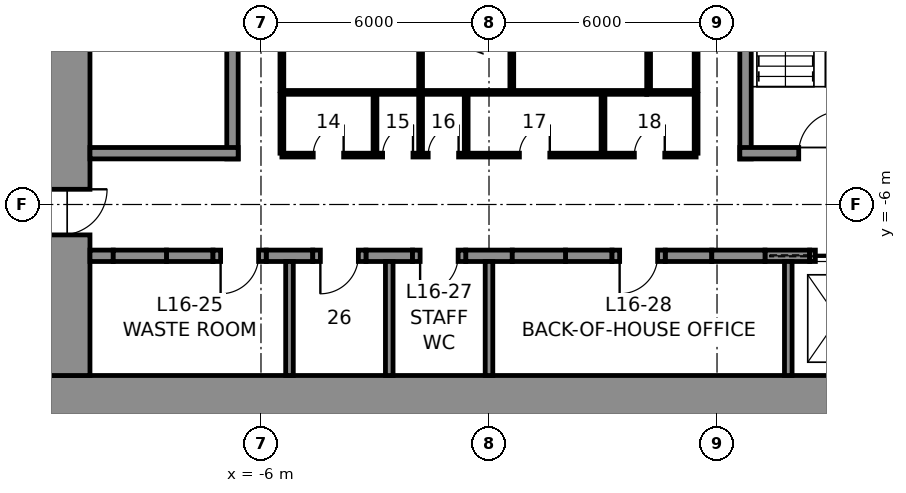
"""IFC4 building model, lengths in metres.
Left out: names, types, materials, properties, quantities, classifications, styles, units other than length and angle.
Written with IfcOpenShell. Run it as: python <this file> out.ifc"""

import sys

from ifc_helpers import new_model, si_unit, direction, frame, frame_2d, origin, place, context, subcontext, project, spatial, rectangle, extrude, element, fill, save


model = new_model("IFC4")
c1 = context("Model", 3, precision=1e-05, world=origin(), true_north=direction((0.0, 1.0)))
c2 = subcontext(c1, "Body", "Model", "MODEL_VIEW")
j1 = project(units=[si_unit("LENGTHUNIT", "METRE"), si_unit("PLANEANGLEUNIT", "RADIAN")], contexts=[c1])
p1 = place(None, origin())
s1 = spatial("IfcSite", under=j1, at=p1, CompositionType="ELEMENT")
p2 = place(p1, origin())
s2 = spatial("IfcBuilding", under=s1, at=p2, CompositionType="ELEMENT")
p3 = place(p2, frame((0.0, 0.0, 86.0)))
s3 = spatial("IfcBuildingStorey", under=s2, at=p3, CompositionType="ELEMENT", Elevation=86.0)
p4 = place(p3, frame((12.0, -11.25, 0.0), z_axis=(0.0, 0.0, 1.0), x_axis=(-1.0, 0.0, 0.0)))
e1 = element("IfcWall", 1, at=p4, inside=s3, PredefinedType="SHEAR", context=c2, shape_type="SweptSolid", body=[
    extrude(rectangle(XDim=24.0, YDim=1.5, at=frame_2d((12.0, 0.0))), origin(), (0.0, 0.0, 1.0), 4.6),
])
p5 = place(p3, frame((-11.25, -10.5, 0.0), z_axis=(0.0, 0.0, 1.0), x_axis=(0.0, 1.0, 0.0)))
e2 = element("IfcWall", 2, at=p5, inside=s3, PredefinedType="SHEAR", context=c2, shape_type="SweptSolid", body=[
    extrude(rectangle(XDim=21.0, YDim=1.5, at=frame_2d((10.5, 0.0))), origin(), (0.0, 0.0, 1.0), 4.6),
])
p6 = place(p5, frame((16.1, 0.0, 0.0)))
e3 = element("IfcOpeningElement", 3, at=p6, cuts=e2, PredefinedType="OPENING", context=c2, shape_type="SweptSolid", body=[
    extrude(rectangle(XDim=1.2, YDim=2.3, at=frame_2d((0.6, 1.15))), frame((0.0, 0.76, 0.0), z_axis=(0.0, -1.0, 0.0), x_axis=(1.0, 0.0, 0.0)), (0.0, 0.0, 1.0), 1.52),
])
p7 = place(p5, frame((3.7, 0.0, 0.0)))
e4 = element("IfcOpeningElement", 4, at=p7, cuts=e2, PredefinedType="OPENING", context=c2, shape_type="SweptSolid", body=[
    extrude(rectangle(XDim=1.2, YDim=2.3, at=frame_2d((0.6, 1.15))), frame((0.0, 0.76, 0.0), z_axis=(0.0, -1.0, 0.0), x_axis=(1.0, 0.0, 0.0)), (0.0, 0.0, 1.0), 1.52),
])
p8 = place(p3, frame((-10.5, -7.35, 0.0), z_axis=(0.0, 0.0, 1.0), x_axis=(1.0, 0.0, 0.0)))
e5 = element("IfcWall", 5, at=p8, inside=s3, PredefinedType="SHEAR", context=c2, shape_type="SweptSolid", body=[
    extrude(rectangle(XDim=0.613, YDim=0.3, at=frame_2d((0.306, 0.0))), origin(), (0.0, 0.0, 1.0), 4.6),
])
for number, where, z_axis, x_axis in (
    (6, (-8.488, -7.35, 0.0), (0.0, 0.0, 1.0), (1.0, 0.0, 0.0)),
    (7, (-5.863, -7.35, 0.0), (0.0, 0.0, 1.0), (1.0, 0.0, 0.0)),
    (8, (-3.238, -7.35, 0.0), (0.0, 0.0, 1.0), (1.0, 0.0, 0.0)),
    (9, (-0.613, -7.35, 0.0), (0.0, 0.0, 1.0), (1.0, 0.0, 0.0)),
    (10, (2.012, -7.35, 0.0), (0.0, 0.0, 1.0), (1.0, 0.0, 0.0)),
    (11, (4.637, -7.35, 0.0), (0.0, 0.0, 1.0), (1.0, 0.0, 0.0)),
):
    element("IfcWall", number, at=place(p3, frame(where, z_axis=z_axis, x_axis=x_axis)), inside=s3, PredefinedType="SHEAR", context=c2, shape_type="SweptSolid", body=[
        extrude(rectangle(XDim=1.225, YDim=0.3, at=frame_2d((0.613, 0.0))), origin(), (0.0, 0.0, 1.0), 4.6),
    ])
p9 = place(p3, frame((7.262, -7.35, 0.0), z_axis=(0.0, 0.0, 1.0), x_axis=(1.0, 0.0, 0.0)))
e12 = element("IfcWall", 12, at=p9, inside=s3, PredefinedType="SHEAR", context=c2, shape_type="SweptSolid", body=[
    extrude(rectangle(XDim=1.175, YDim=0.3, at=frame_2d((0.587, 0.0))), origin(), (0.0, 0.0, 1.0), 4.6),
])
p10 = place(p3, frame((-9.887, -7.35, 0.0), z_axis=(0.0, 0.0, 1.0), x_axis=(1.0, 0.0, 0.0)))
e13 = element("IfcWall", 13, at=p10, inside=s3, PredefinedType="PARTITIONING", context=c2, shape_type="SweptSolid", body=[
    extrude(rectangle(XDim=1.4, YDim=0.3, at=frame_2d((0.7, 0.0))), origin(), (0.0, 0.0, 1.0), 4.6),
])
p11 = place(p3, frame((-7.262, -7.35, 0.0), z_axis=(0.0, 0.0, 1.0), x_axis=(1.0, 0.0, 0.0)))
e14 = element("IfcWall", 14, at=p11, inside=s3, PredefinedType="PARTITIONING", context=c2, shape_type="SweptSolid", body=[
    extrude(rectangle(XDim=1.4, YDim=0.3, at=frame_2d((0.7, 0.0))), origin(), (0.0, 0.0, 1.0), 4.6),
])
p12 = place(p11, frame((0.2, 0.0, 0.0)))
e15 = element("IfcOpeningElement", 15, at=p12, cuts=e14, PredefinedType="OPENING", context=c2, shape_type="SweptSolid", body=[
    extrude(rectangle(XDim=1.0, YDim=2.3, at=frame_2d((0.5, 1.15))), frame((0.0, 0.16, 0.0), z_axis=(0.0, -1.0, 0.0), x_axis=(1.0, 0.0, 0.0)), (0.0, 0.0, 1.0), 0.32),
])
p13 = place(p3, frame((-4.637, -7.35, 0.0), z_axis=(0.0, 0.0, 1.0), x_axis=(1.0, 0.0, 0.0)))
e16 = element("IfcWall", 16, at=p13, inside=s3, PredefinedType="PARTITIONING", context=c2, shape_type="SweptSolid", body=[
    extrude(rectangle(XDim=1.4, YDim=0.3, at=frame_2d((0.7, 0.0))), origin(), (0.0, 0.0, 1.0), 4.6),
])
p14 = place(p13, frame((0.2, 0.0, 0.0)))
e17 = element("IfcOpeningElement", 17, at=p14, cuts=e16, PredefinedType="OPENING", context=c2, shape_type="SweptSolid", body=[
    extrude(rectangle(XDim=1.0, YDim=2.3, at=frame_2d((0.5, 1.15))), frame((0.0, 0.16, 0.0), z_axis=(0.0, -1.0, 0.0), x_axis=(1.0, 0.0, 0.0)), (0.0, 0.0, 1.0), 0.32),
])
p15 = place(p3, frame((-2.012, -7.35, 0.0), z_axis=(0.0, 0.0, 1.0), x_axis=(1.0, 0.0, 0.0)))
e18 = element("IfcWall", 18, at=p15, inside=s3, PredefinedType="PARTITIONING", context=c2, shape_type="SweptSolid", body=[
    extrude(rectangle(XDim=1.4, YDim=0.3, at=frame_2d((0.7, 0.0))), origin(), (0.0, 0.0, 1.0), 4.6),
])
p16 = place(p15, frame((0.2, 0.0, 0.0)))
e19 = element("IfcOpeningElement", 19, at=p16, cuts=e18, PredefinedType="OPENING", context=c2, shape_type="SweptSolid", body=[
    extrude(rectangle(XDim=1.0, YDim=2.3, at=frame_2d((0.5, 1.15))), frame((0.0, 0.16, 0.0), z_axis=(0.0, -1.0, 0.0), x_axis=(1.0, 0.0, 0.0)), (0.0, 0.0, 1.0), 0.32),
])
p17 = place(p3, frame((0.613, -7.35, 0.0), z_axis=(0.0, 0.0, 1.0), x_axis=(1.0, 0.0, 0.0)))
e20 = element("IfcWall", 20, at=p17, inside=s3, PredefinedType="PARTITIONING", context=c2, shape_type="SweptSolid", body=[
    extrude(rectangle(XDim=1.4, YDim=0.3, at=frame_2d((0.7, 0.0))), origin(), (0.0, 0.0, 1.0), 4.6),
])
p18 = place(p3, frame((3.238, -7.35, 0.0), z_axis=(0.0, 0.0, 1.0), x_axis=(1.0, 0.0, 0.0)))
e21 = element("IfcWall", 21, at=p18, inside=s3, PredefinedType="PARTITIONING", context=c2, shape_type="SweptSolid", body=[
    extrude(rectangle(XDim=1.4, YDim=0.3, at=frame_2d((0.7, 0.0))), origin(), (0.0, 0.0, 1.0), 4.6),
])
p19 = place(p18, frame((0.2, 0.0, 0.0)))
e22 = element("IfcOpeningElement", 22, at=p19, cuts=e21, PredefinedType="OPENING", context=c2, shape_type="SweptSolid", body=[
    extrude(rectangle(XDim=1.0, YDim=2.3, at=frame_2d((0.5, 1.15))), frame((0.0, 0.16, 0.0), z_axis=(0.0, -1.0, 0.0), x_axis=(1.0, 0.0, 0.0)), (0.0, 0.0, 1.0), 0.32),
])
p20 = place(p3, frame((5.863, -7.35, 0.0), z_axis=(0.0, 0.0, 1.0), x_axis=(1.0, 0.0, 0.0)))
e23 = element("IfcWall", 23, at=p20, inside=s3, PredefinedType="PARTITIONING", context=c2, shape_type="SweptSolid", body=[
    extrude(rectangle(XDim=1.4, YDim=0.3, at=frame_2d((0.7, 0.0))), origin(), (0.0, 0.0, 1.0), 4.6),
])
p21 = place(p3, frame((8.438, -7.35, 0.0), z_axis=(0.0, 0.0, 1.0), x_axis=(1.0, 0.0, 0.0)))
e24 = element("IfcWall", 24, at=p21, inside=s3, PredefinedType="PARTITIONING", context=c2, shape_type="SweptSolid", body=[
    extrude(rectangle(XDim=1.5, YDim=0.3, at=frame_2d((0.75, 0.0))), origin(), (0.0, 0.0, 1.0), 4.6),
])
p22 = place(p21, frame((0.15, 0.0, 0.0)))
e25 = element("IfcOpeningElement", 25, at=p22, cuts=e24, PredefinedType="OPENING", context=c2, shape_type="SweptSolid", body=[
    extrude(rectangle(XDim=1.2, YDim=2.3, at=frame_2d((0.6, 1.15))), frame((0.0, 0.16, 0.0), z_axis=(0.0, -1.0, 0.0), x_axis=(1.0, 0.0, 0.0)), (0.0, 0.0, 1.0), 0.32),
])
for number, where, z_axis, x_axis in (
    (26, (-5.25, -10.5, 0.0), (0.0, 0.0, 1.0), (0.0, 1.0, 0.0)),
    (27, (-2.625, -10.5, 0.0), (0.0, 0.0, 1.0), (0.0, 1.0, 0.0)),
    (28, (0.0, -10.5, 0.0), (0.0, 0.0, 1.0), (0.0, 1.0, 0.0)),
    (29, (7.875, -10.5, 0.0), (0.0, 0.0, 1.0), (0.0, 1.0, 0.0)),
):
    element("IfcWall", number, at=place(p3, frame(where, z_axis=z_axis, x_axis=x_axis)), inside=s3, PredefinedType="PARTITIONING", context=c2, shape_type="SweptSolid", body=[
        extrude(rectangle(XDim=3.0, YDim=0.2, at=frame_2d((1.5, 0.0))), origin(), (0.0, 0.0, 1.0), 4.6),
    ])
p23 = place(p3, frame((-6.75, -4.8, 0.0), z_axis=(0.0, 0.0, 1.0), x_axis=(0.0, 1.0, 0.0)))
e30 = element("IfcWall", 30, at=p23, inside=s3, PredefinedType="SOLIDWALL", context=c2, shape_type="SweptSolid", body=[
    extrude(rectangle(XDim=9.6, YDim=0.3, at=frame_2d((4.8, 0.0))), origin(), (0.0, 0.0, 1.0), 4.35),
])
p24 = place(p3, frame((-6.6, -4.65, 0.0), z_axis=(0.0, 0.0, 1.0), x_axis=(-1.0, 0.0, 0.0)))
e31 = element("IfcWall", 31, at=p24, inside=s3, PredefinedType="SOLIDWALL", context=c2, shape_type="SweptSolid", body=[
    extrude(rectangle(XDim=3.9, YDim=0.3, at=frame_2d((1.95, 0.0))), origin(), (0.0, 0.0, 1.0), 4.35),
])
p25 = place(p3, frame((6.75, -4.8, 0.0), z_axis=(0.0, 0.0, 1.0), x_axis=(0.0, 1.0, 0.0)))
e32 = element("IfcWall", 32, at=p25, inside=s3, PredefinedType="SOLIDWALL", context=c2, shape_type="SweptSolid", body=[
    extrude(rectangle(XDim=9.6, YDim=0.3, at=frame_2d((4.8, 0.0))), origin(), (0.0, 0.0, 1.0), 4.35),
])
p26 = place(p3, frame((10.5, -4.65, 0.0), z_axis=(0.0, 0.0, 1.0), x_axis=(-1.0, 0.0, 0.0)))
e33 = element("IfcWall", 33, at=p26, inside=s3, PredefinedType="SOLIDWALL", context=c2, shape_type="SweptSolid", body=[
    extrude(rectangle(XDim=3.9, YDim=0.3, at=frame_2d((1.95, 0.0))), origin(), (0.0, 0.0, 1.0), 4.35),
])
p27 = place(p26, frame((1.25, 0.0, 0.0)))
e34 = element("IfcOpeningElement", 34, at=p27, cuts=e33, PredefinedType="OPENING", context=c2, shape_type="SweptSolid", body=[
    extrude(rectangle(XDim=1.1, YDim=2.3, at=frame_2d((0.55, 1.15))), frame((0.0, 0.16, 0.0), z_axis=(0.0, -1.0, 0.0), x_axis=(1.0, 0.0, 0.0)), (0.0, 0.0, 1.0), 0.32),
])
p28 = place(p3, frame((4.15, -3.05, 0.0), z_axis=(0.0, 0.0, 1.0), x_axis=(-1.0, 0.0, 0.0)))
e35 = element("IfcWall", 35, at=p28, inside=s3, PredefinedType="PARTITIONING", context=c2, shape_type="SweptSolid", body=[
    extrude(rectangle(XDim=9.6, YDim=0.1, at=frame_2d((4.8, 0.0))), origin(), (0.0, 0.0, 1.0), 4.35),
])
p29 = place(p3, frame((5.45, -3.05, 0.0), z_axis=(0.0, 0.0, 1.0), x_axis=(-1.0, 0.0, 0.0)))
e36 = element("IfcWall", 36, at=p29, inside=s3, PredefinedType="PARTITIONING", context=c2, shape_type="SweptSolid", body=[
    extrude(rectangle(XDim=1.3, YDim=0.1, at=frame_2d((0.65, 0.0))), origin(), (0.0, 0.0, 1.0), 4.35),
])
for number, where, z_axis, x_axis in (
    (37, (5.45, 3.0, 0.0), (0.0, 0.0, 1.0), (0.0, -1.0, 0.0)),
    (38, (-5.45, -3.0, 0.0), (0.0, 0.0, 1.0), (0.0, 1.0, 0.0)),
    (39, (-1.8, -3.0, 0.0), (0.0, 0.0, 1.0), (0.0, 1.0, 0.0)),
    (40, (0.6, -3.0, 0.0), (0.0, 0.0, 1.0), (0.0, 1.0, 0.0)),
    (41, (4.2, -3.0, 0.0), (0.0, 0.0, 1.0), (0.0, 1.0, 0.0)),
):
    element("IfcWall", number, at=place(p3, frame(where, z_axis=z_axis, x_axis=x_axis)), inside=s3, PredefinedType="PARTITIONING", context=c2, shape_type="SweptSolid", body=[
        extrude(rectangle(XDim=6.0, YDim=0.1, at=frame_2d((3.0, 0.0))), origin(), (0.0, 0.0, 1.0), 4.35),
    ])
p30 = place(p3, frame((5.45, -4.7, 0.0), z_axis=(0.0, 0.0, 1.0), x_axis=(-1.0, 0.0, 0.0)))
e42 = element("IfcWall", 42, at=p30, inside=s3, PredefinedType="PARTITIONING", context=c2, shape_type="SweptSolid", body=[
    extrude(rectangle(XDim=10.9, YDim=0.1, at=frame_2d((5.45, 0.0))), origin(), (0.0, 0.0, 1.0), 4.35),
])
p31 = place(p30, frame((9.275, 0.0, 0.0)))
e43 = element("IfcOpeningElement", 43, at=p31, cuts=e42, PredefinedType="OPENING", context=c2, shape_type="SweptSolid", body=[
    extrude(rectangle(XDim=0.8, YDim=2.3, at=frame_2d((0.4, 1.15))), frame((0.0, 0.06, 0.0), z_axis=(0.0, -1.0, 0.0), x_axis=(1.0, 0.0, 0.0)), (0.0, 0.0, 1.0), 0.12),
])
p32 = place(p30, frame((7.45, 0.0, 0.0)))
e44 = element("IfcOpeningElement", 44, at=p32, cuts=e42, PredefinedType="OPENING", context=c2, shape_type="SweptSolid", body=[
    extrude(rectangle(XDim=0.8, YDim=2.3, at=frame_2d((0.4, 1.15))), frame((0.0, 0.06, 0.0), z_axis=(0.0, -1.0, 0.0), x_axis=(1.0, 0.0, 0.0)), (0.0, 0.0, 1.0), 0.12),
])
p33 = place(p30, frame((6.25, 0.0, 0.0)))
e45 = element("IfcOpeningElement", 45, at=p33, cuts=e42, PredefinedType="OPENING", context=c2, shape_type="SweptSolid", body=[
    extrude(rectangle(XDim=0.8, YDim=2.3, at=frame_2d((0.4, 1.15))), frame((0.0, 0.06, 0.0), z_axis=(0.0, -1.0, 0.0), x_axis=(1.0, 0.0, 0.0)), (0.0, 0.0, 1.0), 0.12),
])
p34 = place(p30, frame((3.85, 0.0, 0.0)))
e46 = element("IfcOpeningElement", 46, at=p34, cuts=e42, PredefinedType="OPENING", context=c2, shape_type="SweptSolid", body=[
    extrude(rectangle(XDim=0.8, YDim=2.3, at=frame_2d((0.4, 1.15))), frame((0.0, 0.06, 0.0), z_axis=(0.0, -1.0, 0.0), x_axis=(1.0, 0.0, 0.0)), (0.0, 0.0, 1.0), 0.12),
])
p35 = place(p30, frame((0.825, 0.0, 0.0)))
e47 = element("IfcOpeningElement", 47, at=p35, cuts=e42, PredefinedType="OPENING", context=c2, shape_type="SweptSolid", body=[
    extrude(rectangle(XDim=0.8, YDim=2.3, at=frame_2d((0.4, 1.15))), frame((0.0, 0.06, 0.0), z_axis=(0.0, -1.0, 0.0), x_axis=(1.0, 0.0, 0.0)), (0.0, 0.0, 1.0), 0.12),
])
for number, where, z_axis, x_axis in (
    (48, (-5.45, -3.1, 0.0), (0.0, 0.0, 1.0), (0.0, -1.0, 0.0)),
    (49, (5.45, -3.1, 0.0), (0.0, 0.0, 1.0), (0.0, -1.0, 0.0)),
    (50, (-3.0, -3.1, 0.0), (0.0, 0.0, 1.0), (0.0, -1.0, 0.0)),
    (51, (-1.8, -3.1, 0.0), (0.0, 0.0, 1.0), (0.0, -1.0, 0.0)),
    (52, (-0.6, -3.1, 0.0), (0.0, 0.0, 1.0), (0.0, -1.0, 0.0)),
    (53, (3.0, -3.1, 0.0), (0.0, 0.0, 1.0), (0.0, -1.0, 0.0)),
):
    element("IfcWall", number, at=place(p3, frame(where, z_axis=z_axis, x_axis=x_axis)), inside=s3, PredefinedType="PARTITIONING", context=c2, shape_type="SweptSolid", body=[
        extrude(rectangle(XDim=1.55, YDim=0.1, at=frame_2d((0.775, 0.0))), origin(), (0.0, 0.0, 1.0), 4.35),
    ])
p36 = place(p27, frame((1.1, 0.0, 0.0), z_axis=(0.0, 0.0, 1.0), x_axis=(-1.0, 0.0, 0.0)))
e54 = element("IfcDoor", 54, at=p36, inside=s3, OperationType="SINGLE_SWING_RIGHT", PredefinedType="DOOR", context=c2, shape_type="SweptSolid", body=[
    extrude(rectangle(XDim=1.1, YDim=2.3, at=frame_2d((0.55, 1.15))), frame((0.0, 0.025, 0.0), z_axis=(0.0, -1.0, 0.0), x_axis=(1.0, 0.0, 0.0)), (0.0, 0.0, 1.0), 0.05),
])
fill(e34, e54)
p37 = place(p31, frame((0.8, 0.0, 0.0), z_axis=(0.0, 0.0, 1.0), x_axis=(-1.0, 0.0, 0.0)))
e55 = element("IfcDoor", 55, at=p37, inside=s3, OperationType="SINGLE_SWING_RIGHT", PredefinedType="DOOR", context=c2, shape_type="SweptSolid", body=[
    extrude(rectangle(XDim=0.8, YDim=2.3, at=frame_2d((0.4, 1.15))), frame((0.0, 0.025, 0.0), z_axis=(0.0, -1.0, 0.0), x_axis=(1.0, 0.0, 0.0)), (0.0, 0.0, 1.0), 0.05),
])
fill(e43, e55)
p38 = place(p32, frame((0.8, 0.0, 0.0), z_axis=(0.0, 0.0, 1.0), x_axis=(-1.0, 0.0, 0.0)))
e56 = element("IfcDoor", 56, at=p38, inside=s3, OperationType="SINGLE_SWING_RIGHT", PredefinedType="DOOR", context=c2, shape_type="SweptSolid", body=[
    extrude(rectangle(XDim=0.8, YDim=2.3, at=frame_2d((0.4, 1.15))), frame((0.0, 0.025, 0.0), z_axis=(0.0, -1.0, 0.0), x_axis=(1.0, 0.0, 0.0)), (0.0, 0.0, 1.0), 0.05),
])
fill(e44, e56)
p39 = place(p33, frame((0.8, 0.0, 0.0), z_axis=(0.0, 0.0, 1.0), x_axis=(-1.0, 0.0, 0.0)))
e57 = element("IfcDoor", 57, at=p39, inside=s3, OperationType="SINGLE_SWING_RIGHT", PredefinedType="DOOR", context=c2, shape_type="SweptSolid", body=[
    extrude(rectangle(XDim=0.8, YDim=2.3, at=frame_2d((0.4, 1.15))), frame((0.0, 0.025, 0.0), z_axis=(0.0, -1.0, 0.0), x_axis=(1.0, 0.0, 0.0)), (0.0, 0.0, 1.0), 0.05),
])
fill(e45, e57)
p40 = place(p34, frame((0.8, 0.0, 0.0), z_axis=(0.0, 0.0, 1.0), x_axis=(-1.0, 0.0, 0.0)))
e58 = element("IfcDoor", 58, at=p40, inside=s3, OperationType="SINGLE_SWING_RIGHT", PredefinedType="DOOR", context=c2, shape_type="SweptSolid", body=[
    extrude(rectangle(XDim=0.8, YDim=2.3, at=frame_2d((0.4, 1.15))), frame((0.0, 0.025, 0.0), z_axis=(0.0, -1.0, 0.0), x_axis=(1.0, 0.0, 0.0)), (0.0, 0.0, 1.0), 0.05),
])
fill(e46, e58)
p41 = place(p35, frame((0.8, 0.0, 0.0), z_axis=(0.0, 0.0, 1.0), x_axis=(-1.0, 0.0, 0.0)))
e59 = element("IfcDoor", 59, at=p41, inside=s3, OperationType="SINGLE_SWING_RIGHT", PredefinedType="DOOR", context=c2, shape_type="SweptSolid", body=[
    extrude(rectangle(XDim=0.8, YDim=2.3, at=frame_2d((0.4, 1.15))), frame((0.0, 0.025, 0.0), z_axis=(0.0, -1.0, 0.0), x_axis=(1.0, 0.0, 0.0)), (0.0, 0.0, 1.0), 0.05),
])
fill(e47, e59)
p42 = place(p12, frame((1.0, 0.0, 0.0), z_axis=(0.0, 0.0, 1.0), x_axis=(-1.0, 0.0, 0.0)))
e60 = element("IfcDoor", 60, at=p42, inside=s3, OperationType="SINGLE_SWING_RIGHT", PredefinedType="DOOR", context=c2, shape_type="SweptSolid", body=[
    extrude(rectangle(XDim=1.0, YDim=2.3, at=frame_2d((0.5, 1.15))), frame((0.0, 0.025, 0.0), z_axis=(0.0, -1.0, 0.0), x_axis=(1.0, 0.0, 0.0)), (0.0, 0.0, 1.0), 0.05),
])
fill(e15, e60)
p43 = place(p14, frame((1.0, 0.0, 0.0), z_axis=(0.0, 0.0, 1.0), x_axis=(-1.0, 0.0, 0.0)))
e61 = element("IfcDoor", 61, at=p43, inside=s3, OperationType="SINGLE_SWING_RIGHT", PredefinedType="DOOR", context=c2, shape_type="SweptSolid", body=[
    extrude(rectangle(XDim=1.0, YDim=2.3, at=frame_2d((0.5, 1.15))), frame((0.0, 0.025, 0.0), z_axis=(0.0, -1.0, 0.0), x_axis=(1.0, 0.0, 0.0)), (0.0, 0.0, 1.0), 0.05),
])
fill(e17, e61)
p44 = place(p16, frame((1.0, 0.0, 0.0), z_axis=(0.0, 0.0, 1.0), x_axis=(-1.0, 0.0, 0.0)))
e62 = element("IfcDoor", 62, at=p44, inside=s3, OperationType="SINGLE_SWING_RIGHT", PredefinedType="DOOR", context=c2, shape_type="SweptSolid", body=[
    extrude(rectangle(XDim=1.0, YDim=2.3, at=frame_2d((0.5, 1.15))), frame((0.0, 0.025, 0.0), z_axis=(0.0, -1.0, 0.0), x_axis=(1.0, 0.0, 0.0)), (0.0, 0.0, 1.0), 0.05),
])
fill(e19, e62)
p45 = place(p19, frame((1.0, 0.0, 0.0), z_axis=(0.0, 0.0, 1.0), x_axis=(-1.0, 0.0, 0.0)))
e63 = element("IfcDoor", 63, at=p45, inside=s3, OperationType="SINGLE_SWING_RIGHT", PredefinedType="DOOR", context=c2, shape_type="SweptSolid", body=[
    extrude(rectangle(XDim=1.0, YDim=2.3, at=frame_2d((0.5, 1.15))), frame((0.0, 0.025, 0.0), z_axis=(0.0, -1.0, 0.0), x_axis=(1.0, 0.0, 0.0)), (0.0, 0.0, 1.0), 0.05),
])
fill(e22, e63)
p46 = place(p7, frame((1.2, 0.0, 0.0), z_axis=(0.0, 0.0, 1.0), x_axis=(-1.0, 0.0, 0.0)))
e64 = element("IfcDoor", 64, at=p46, inside=s3, OperationType="SINGLE_SWING_LEFT", PredefinedType="DOOR", context=c2, shape_type="SweptSolid", body=[
    extrude(rectangle(XDim=1.2, YDim=2.3, at=frame_2d((0.6, 1.15))), frame((0.0, 0.025, 0.0), z_axis=(0.0, -1.0, 0.0), x_axis=(1.0, 0.0, 0.0)), (0.0, 0.0, 1.0), 0.05),
])
fill(e4, e64)
p47 = place(p22, origin())
e65 = element("IfcDoor", 65, at=p47, inside=s3, OperationType="SLIDING_TO_LEFT", PredefinedType="DOOR", context=c2, shape_type="SweptSolid", body=[
    extrude(rectangle(XDim=1.2, YDim=2.3, at=frame_2d((0.6, 1.15))), frame((0.0, 0.025, 0.0), z_axis=(0.0, -1.0, 0.0), x_axis=(1.0, 0.0, 0.0)), (0.0, 0.0, 1.0), 0.05),
])
fill(e25, e65)
save(model, sys.argv[1])
